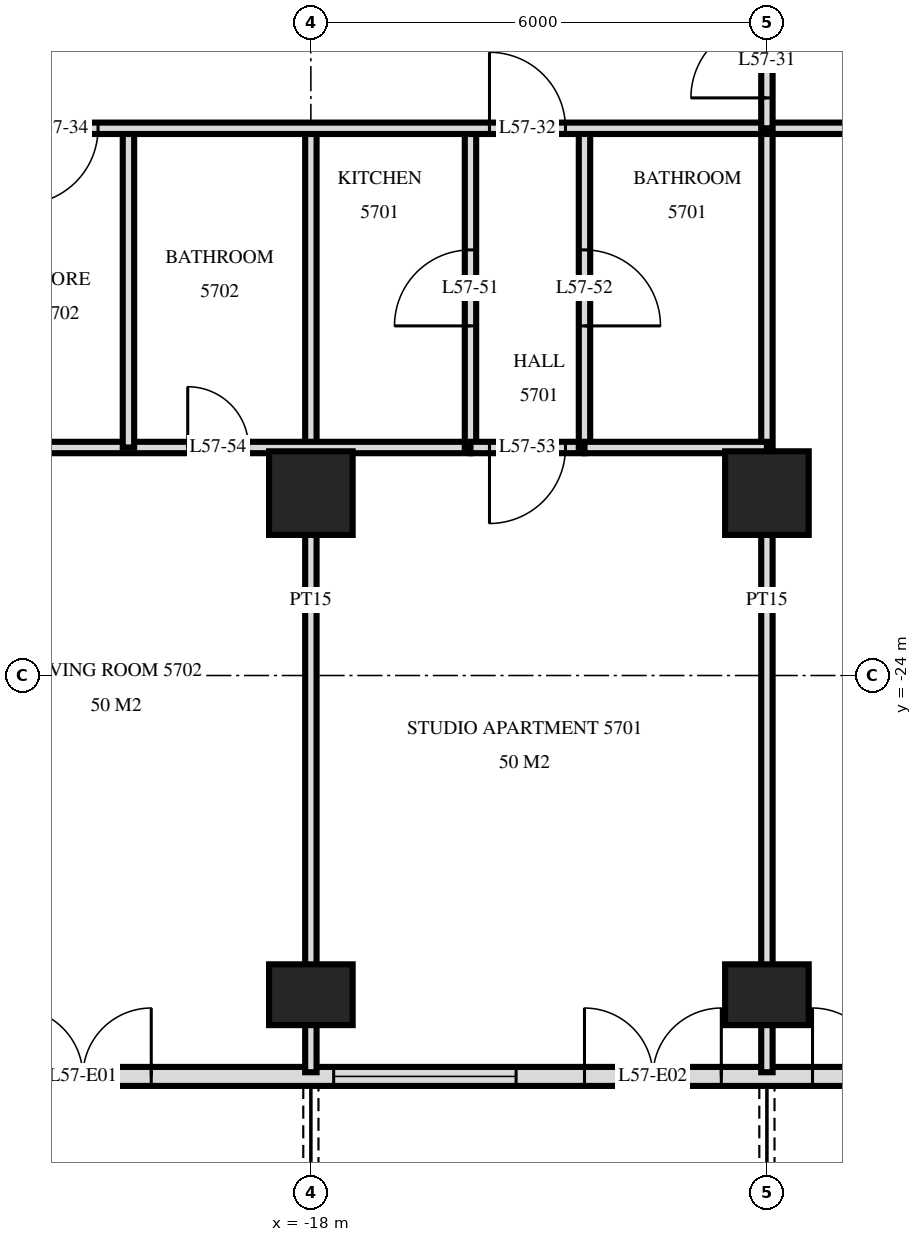
"""IFC4 building model, lengths in metres.
Left out: names, types, materials, properties, quantities, classifications, styles, units other than length and angle.
Written with IfcOpenShell. Run it as: python <this file> out.ifc"""

import sys

from ifc_helpers import new_model, si_unit, direction, frame, frame_2d, origin, origin_2d, place, context, subcontext, project, spatial, rectangle, extrude, element, fill, save


model = new_model("IFC4")
c1 = context("Model", 3, precision=1e-05, world=origin(), true_north=direction((0.0, 1.0)))
c2 = subcontext(c1, "Body", "Model", "MODEL_VIEW")
j1 = project(units=[si_unit("LENGTHUNIT", "METRE"), si_unit("PLANEANGLEUNIT", "RADIAN")], contexts=[c1])
p1 = place(None, origin())
s1 = spatial("IfcSite", under=j1, at=p1, CompositionType="ELEMENT")
p2 = place(p1, origin())
s2 = spatial("IfcBuilding", under=s1, at=p2, CompositionType="ELEMENT")
p3 = place(p2, frame((0.0, 0.0, 218.6)))
s3 = spatial("IfcBuildingStorey", under=s2, at=p3, CompositionType="ELEMENT", Elevation=218.6)
p4 = place(p3, frame((-18.0, -28.2, 0.0), z_axis=(0.0, 0.0, 1.0), x_axis=(1.0, 0.0, 0.0)))
e1 = element("IfcColumn", 1, at=p4, inside=s3, PredefinedType="COLUMN", context=c2, shape_type="SweptSolid", body=[
    extrude(rectangle(XDim=1.1, YDim=0.8, at=origin_2d()), origin(), (0.0, 0.0, 1.0), 3.5),
])
p5 = place(p3, frame((-18.0, -21.6, 0.0), z_axis=(0.0, 0.0, 1.0), x_axis=(1.0, 0.0, 0.0)))
e2 = element("IfcColumn", 2, at=p5, inside=s3, PredefinedType="COLUMN", context=c2, shape_type="SweptSolid", body=[
    extrude(rectangle(XDim=1.1, YDim=1.1, at=origin_2d()), origin(), (0.0, 0.0, 1.0), 3.5),
])
p6 = place(p3, frame((-12.0, -28.2, 0.0), z_axis=(0.0, 0.0, 1.0), x_axis=(1.0, 0.0, 0.0)))
e3 = element("IfcColumn", 3, at=p6, inside=s3, PredefinedType="COLUMN", context=c2, shape_type="SweptSolid", body=[
    extrude(rectangle(XDim=1.1, YDim=0.8, at=origin_2d()), origin(), (0.0, 0.0, 1.0), 3.5),
])
p7 = place(p3, frame((-12.0, -21.6, 0.0), z_axis=(0.0, 0.0, 1.0), x_axis=(1.0, 0.0, 0.0)))
e4 = element("IfcColumn", 4, at=p7, inside=s3, PredefinedType="COLUMN", context=c2, shape_type="SweptSolid", body=[
    extrude(rectangle(XDim=1.1, YDim=1.1, at=origin_2d()), origin(), (0.0, 0.0, 1.0), 3.5),
])
p8 = place(p3, frame((-22.475, -29.275, 0.0), z_axis=(0.0, 0.0, 1.0), x_axis=(1.0, 0.0, 0.0)))
e5 = element("IfcWall", 5, at=p8, inside=s3, PredefinedType="SOLIDWALL", context=c2, shape_type="SweptSolid", body=[
    extrude(rectangle(XDim=44.951, YDim=0.25, at=frame_2d((22.475, 0.0))), origin(), (0.0, 0.0, 1.0), 3.22),
])
p9 = place(p8, frame((0.575, 0.0, 0.0)))
e6 = element("IfcOpeningElement", 6, at=p9, cuts=e5, PredefinedType="OPENING", context=c2, shape_type="SweptSolid", body=[
    extrude(rectangle(XDim=1.8, YDim=2.4, at=frame_2d((0.9, 1.2))), frame((0.0, 0.135, 0.0), z_axis=(0.0, -1.0, 0.0), x_axis=(1.0, 0.0, 0.0)), (0.0, 0.0, 1.0), 0.27),
])
p10 = place(p8, frame((4.775, 0.0, 0.9)))
e7 = element("IfcOpeningElement", 7, at=p10, cuts=e5, PredefinedType="OPENING", context=c2, shape_type="SweptSolid", body=[
    extrude(rectangle(XDim=2.4, YDim=1.5, at=frame_2d((1.2, 0.75))), frame((0.0, 0.135, 0.0), z_axis=(0.0, -1.0, 0.0), x_axis=(1.0, 0.0, 0.0)), (0.0, 0.0, 1.0), 0.27),
])
p11 = place(p8, frame((8.075, 0.0, 0.0)))
e8 = element("IfcOpeningElement", 8, at=p11, cuts=e5, PredefinedType="OPENING", context=c2, shape_type="SweptSolid", body=[
    extrude(rectangle(XDim=1.8, YDim=2.4, at=frame_2d((0.9, 1.2))), frame((0.0, 0.135, 0.0), z_axis=(0.0, -1.0, 0.0), x_axis=(1.0, 0.0, 0.0)), (0.0, 0.0, 1.0), 0.27),
])
p12 = place(p8, frame((11.075, 0.0, 0.0)))
e9 = element("IfcOpeningElement", 9, at=p12, cuts=e5, PredefinedType="OPENING", context=c2, shape_type="SweptSolid", body=[
    extrude(rectangle(XDim=1.8, YDim=2.4, at=frame_2d((0.9, 1.2))), frame((0.0, 0.135, 0.0), z_axis=(0.0, -1.0, 0.0), x_axis=(1.0, 0.0, 0.0)), (0.0, 0.0, 1.0), 0.27),
])
p13 = place(p8, frame((13.775, 0.0, 0.9)))
e10 = element("IfcOpeningElement", 10, at=p13, cuts=e5, PredefinedType="OPENING", context=c2, shape_type="SweptSolid", body=[
    extrude(rectangle(XDim=2.4, YDim=1.5, at=frame_2d((1.2, 0.75))), frame((0.0, 0.135, 0.0), z_axis=(0.0, -1.0, 0.0), x_axis=(1.0, 0.0, 0.0)), (0.0, 0.0, 1.0), 0.27),
])
p14 = place(p8, frame((16.775, 0.0, 0.9)))
e11 = element("IfcOpeningElement", 11, at=p14, cuts=e5, PredefinedType="OPENING", context=c2, shape_type="SweptSolid", body=[
    extrude(rectangle(XDim=2.4, YDim=1.5, at=frame_2d((1.2, 0.75))), frame((0.0, 0.135, 0.0), z_axis=(0.0, -1.0, 0.0), x_axis=(1.0, 0.0, 0.0)), (0.0, 0.0, 1.0), 0.27),
])
p15 = place(p8, frame((20.075, 0.0, 0.0)))
e12 = element("IfcOpeningElement", 12, at=p15, cuts=e5, PredefinedType="OPENING", context=c2, shape_type="SweptSolid", body=[
    extrude(rectangle(XDim=1.8, YDim=2.4, at=frame_2d((0.9, 1.2))), frame((0.0, 0.135, 0.0), z_axis=(0.0, -1.0, 0.0), x_axis=(1.0, 0.0, 0.0)), (0.0, 0.0, 1.0), 0.27),
])
p16 = place(p8, frame((23.075, 0.0, 0.0)))
e13 = element("IfcOpeningElement", 13, at=p16, cuts=e5, PredefinedType="OPENING", context=c2, shape_type="SweptSolid", body=[
    extrude(rectangle(XDim=1.8, YDim=2.4, at=frame_2d((0.9, 1.2))), frame((0.0, 0.135, 0.0), z_axis=(0.0, -1.0, 0.0), x_axis=(1.0, 0.0, 0.0)), (0.0, 0.0, 1.0), 0.27),
])
p17 = place(p8, frame((25.775, 0.0, 0.9)))
e14 = element("IfcOpeningElement", 14, at=p17, cuts=e5, PredefinedType="OPENING", context=c2, shape_type="SweptSolid", body=[
    extrude(rectangle(XDim=2.4, YDim=1.5, at=frame_2d((1.2, 0.75))), frame((0.0, 0.135, 0.0), z_axis=(0.0, -1.0, 0.0), x_axis=(1.0, 0.0, 0.0)), (0.0, 0.0, 1.0), 0.27),
])
p18 = place(p8, frame((29.075, 0.0, 0.0)))
e15 = element("IfcOpeningElement", 15, at=p18, cuts=e5, PredefinedType="OPENING", context=c2, shape_type="SweptSolid", body=[
    extrude(rectangle(XDim=1.8, YDim=2.4, at=frame_2d((0.9, 1.2))), frame((0.0, 0.135, 0.0), z_axis=(0.0, -1.0, 0.0), x_axis=(1.0, 0.0, 0.0)), (0.0, 0.0, 1.0), 0.27),
])
p19 = place(p8, frame((31.775, 0.0, 0.9)))
e16 = element("IfcOpeningElement", 16, at=p19, cuts=e5, PredefinedType="OPENING", context=c2, shape_type="SweptSolid", body=[
    extrude(rectangle(XDim=2.4, YDim=1.5, at=frame_2d((1.2, 0.75))), frame((0.0, 0.135, 0.0), z_axis=(0.0, -1.0, 0.0), x_axis=(1.0, 0.0, 0.0)), (0.0, 0.0, 1.0), 0.27),
])
p20 = place(p8, frame((35.075, 0.0, 0.0)))
e17 = element("IfcOpeningElement", 17, at=p20, cuts=e5, PredefinedType="OPENING", context=c2, shape_type="SweptSolid", body=[
    extrude(rectangle(XDim=1.8, YDim=2.4, at=frame_2d((0.9, 1.2))), frame((0.0, 0.135, 0.0), z_axis=(0.0, -1.0, 0.0), x_axis=(1.0, 0.0, 0.0)), (0.0, 0.0, 1.0), 0.27),
])
p21 = place(p8, frame((41.075, 0.0, 0.0)))
e18 = element("IfcOpeningElement", 18, at=p21, cuts=e5, PredefinedType="OPENING", context=c2, shape_type="SweptSolid", body=[
    extrude(rectangle(XDim=1.8, YDim=2.4, at=frame_2d((0.9, 1.2))), frame((0.0, 0.135, 0.0), z_axis=(0.0, -1.0, 0.0), x_axis=(1.0, 0.0, 0.0)), (0.0, 0.0, 1.0), 0.27),
])
p22 = place(p3, frame((-12.0, -16.8, 0.0), z_axis=(0.0, 0.0, 1.0), x_axis=(0.0, 1.0, 0.0)))
e19 = element("IfcWall", 19, at=p22, inside=s3, PredefinedType="PARTITIONING", context=c2, shape_type="SweptSolid", body=[
    extrude(rectangle(XDim=1.75, YDim=0.15, at=frame_2d((0.875, 0.0))), origin(), (0.0, 0.0, 1.0), 3.22),
])
p23 = place(p22, frame((0.4, 0.0, 0.0)))
e20 = element("IfcOpeningElement", 20, at=p23, cuts=e19, PredefinedType="OPENING", context=c2, shape_type="SweptSolid", body=[
    extrude(rectangle(XDim=1.0, YDim=2.1, at=frame_2d((0.5, 1.05))), frame((0.0, 0.085, 0.0), z_axis=(0.0, -1.0, 0.0), x_axis=(1.0, 0.0, 0.0)), (0.0, 0.0, 1.0), 0.17),
])
p24 = place(p3, frame((-12.0, -29.22, 0.0), z_axis=(0.0, 0.0, 1.0), x_axis=(0.0, 1.0, 0.0)))
e21 = element("IfcWall", 21, at=p24, inside=s3, PredefinedType="PARTITIONING", context=c2, shape_type="SweptSolid", body=[
    extrude(rectangle(XDim=12.42, YDim=0.15, at=frame_2d((6.21, 0.0))), origin(), (0.0, 0.0, 1.0), 3.22),
])
p25 = place(p3, frame((-14.4, -21.0, 0.0), z_axis=(0.0, 0.0, 1.0), x_axis=(0.0, 1.0, 0.0)))
e22 = element("IfcWall", 22, at=p25, inside=s3, PredefinedType="PARTITIONING", context=c2, shape_type="SweptSolid", body=[
    extrude(rectangle(XDim=4.2, YDim=0.15, at=frame_2d((2.1, 0.0))), origin(), (0.0, 0.0, 1.0), 3.22),
])
p26 = place(p25, frame((1.6, 0.0, 0.0)))
e23 = element("IfcOpeningElement", 23, at=p26, cuts=e22, PredefinedType="OPENING", context=c2, shape_type="SweptSolid", body=[
    extrude(rectangle(XDim=1.0, YDim=2.1, at=frame_2d((0.5, 1.05))), frame((0.0, 0.085, 0.0), z_axis=(0.0, -1.0, 0.0), x_axis=(1.0, 0.0, 0.0)), (0.0, 0.0, 1.0), 0.17),
])
p27 = place(p3, frame((-15.9, -21.0, 0.0), z_axis=(0.0, 0.0, 1.0), x_axis=(0.0, 1.0, 0.0)))
e24 = element("IfcWall", 24, at=p27, inside=s3, PredefinedType="PARTITIONING", context=c2, shape_type="SweptSolid", body=[
    extrude(rectangle(XDim=4.2, YDim=0.15, at=frame_2d((2.1, 0.0))), origin(), (0.0, 0.0, 1.0), 3.22),
])
p28 = place(p27, frame((1.6, 0.0, 0.0)))
e25 = element("IfcOpeningElement", 25, at=p28, cuts=e24, PredefinedType="OPENING", context=c2, shape_type="SweptSolid", body=[
    extrude(rectangle(XDim=1.0, YDim=2.1, at=frame_2d((0.5, 1.05))), frame((0.0, 0.085, 0.0), z_axis=(0.0, -1.0, 0.0), x_axis=(1.0, 0.0, 0.0)), (0.0, 0.0, 1.0), 0.17),
])
p29 = place(p3, frame((-18.0, -29.22, 0.0), z_axis=(0.0, 0.0, 1.0), x_axis=(0.0, 1.0, 0.0)))
e26 = element("IfcWall", 26, at=p29, inside=s3, PredefinedType="PARTITIONING", context=c2, shape_type="SweptSolid", body=[
    extrude(rectangle(XDim=12.42, YDim=0.15, at=frame_2d((6.21, 0.0))), origin(), (0.0, 0.0, 1.0), 3.22),
])
p30 = place(p3, frame((-20.4, -21.0, 0.0), z_axis=(0.0, 0.0, 1.0), x_axis=(0.0, 1.0, 0.0)))
e27 = element("IfcWall", 27, at=p30, inside=s3, PredefinedType="PARTITIONING", context=c2, shape_type="SweptSolid", body=[
    extrude(rectangle(XDim=4.2, YDim=0.15, at=frame_2d((2.1, 0.0))), origin(), (0.0, 0.0, 1.0), 3.22),
])
p31 = place(p3, frame((-15.9, -21.0, 0.0), z_axis=(0.0, 0.0, 1.0), x_axis=(1.0, 0.0, 0.0)))
e28 = element("IfcWall", 28, at=p31, inside=s3, PredefinedType="PARTITIONING", context=c2, shape_type="SweptSolid", body=[
    extrude(rectangle(XDim=1.5, YDim=0.15, at=frame_2d((0.75, 0.0))), origin(), (0.0, 0.0, 1.0), 3.22),
])
p32 = place(p31, frame((0.25, 0.0, 0.0)))
e29 = element("IfcOpeningElement", 29, at=p32, cuts=e28, PredefinedType="OPENING", context=c2, shape_type="SweptSolid", body=[
    extrude(rectangle(XDim=1.0, YDim=2.1, at=frame_2d((0.5, 1.05))), frame((0.0, 0.085, 0.0), z_axis=(0.0, -1.0, 0.0), x_axis=(1.0, 0.0, 0.0)), (0.0, 0.0, 1.0), 0.17),
])
p33 = place(p3, frame((-22.2, -21.0, 0.0), z_axis=(0.0, 0.0, 1.0), x_axis=(1.0, 0.0, 0.0)))
e30 = element("IfcWall", 30, at=p33, inside=s3, PredefinedType="PARTITIONING", context=c2, shape_type="SweptSolid", body=[
    extrude(rectangle(XDim=6.3, YDim=0.15, at=frame_2d((3.15, 0.0))), origin(), (0.0, 0.0, 1.0), 3.22),
])
p34 = place(p33, frame((2.58, 0.0, 0.0)))
e31 = element("IfcOpeningElement", 31, at=p34, cuts=e30, PredefinedType="OPENING", context=c2, shape_type="SweptSolid", body=[
    extrude(rectangle(XDim=0.8, YDim=2.1, at=frame_2d((0.4, 1.05))), frame((0.0, 0.085, 0.0), z_axis=(0.0, -1.0, 0.0), x_axis=(1.0, 0.0, 0.0)), (0.0, 0.0, 1.0), 0.17),
])
p35 = place(p3, frame((-14.4, -21.0, 0.0), z_axis=(0.0, 0.0, 1.0), x_axis=(1.0, 0.0, 0.0)))
e32 = element("IfcWall", 32, at=p35, inside=s3, PredefinedType="PARTITIONING", context=c2, shape_type="SweptSolid", body=[
    extrude(rectangle(XDim=2.4, YDim=0.15, at=frame_2d((1.2, 0.0))), origin(), (0.0, 0.0, 1.0), 3.22),
])
p36 = place(p3, frame((-26.82, -16.8, 0.0), z_axis=(0.0, 0.0, 1.0), x_axis=(1.0, 0.0, 0.0)))
e33 = element("IfcWall", 33, at=p36, inside=s3, PredefinedType="PARTITIONING", context=c2, shape_type="SweptSolid", body=[
    extrude(rectangle(XDim=53.64, YDim=0.15, at=frame_2d((26.82, 0.0))), origin(), (0.0, 0.0, 1.0), 3.22),
])
p37 = place(p36, frame((11.17, 0.0, 0.0)))
e34 = element("IfcOpeningElement", 34, at=p37, cuts=e33, PredefinedType="OPENING", context=c2, shape_type="SweptSolid", body=[
    extrude(rectangle(XDim=1.0, YDim=2.1, at=frame_2d((0.5, 1.05))), frame((0.0, 0.085, 0.0), z_axis=(0.0, -1.0, 0.0), x_axis=(1.0, 0.0, 0.0)), (0.0, 0.0, 1.0), 0.17),
])
p38 = place(p36, frame((3.22, 0.0, 0.0)))
e35 = element("IfcOpeningElement", 35, at=p38, cuts=e33, PredefinedType="OPENING", context=c2, shape_type="SweptSolid", body=[
    extrude(rectangle(XDim=1.0, YDim=2.1, at=frame_2d((0.5, 1.05))), frame((0.0, 0.085, 0.0), z_axis=(0.0, -1.0, 0.0), x_axis=(1.0, 0.0, 0.0)), (0.0, 0.0, 1.0), 0.17),
])
p39 = place(p36, frame((5.02, 0.0, 0.0)))
e36 = element("IfcOpeningElement", 36, at=p39, cuts=e33, PredefinedType="OPENING", context=c2, shape_type="SweptSolid", body=[
    extrude(rectangle(XDim=1.0, YDim=2.1, at=frame_2d((0.5, 1.05))), frame((0.0, 0.085, 0.0), z_axis=(0.0, -1.0, 0.0), x_axis=(1.0, 0.0, 0.0)), (0.0, 0.0, 1.0), 0.17),
])
p40 = place(p36, frame((47.72, 0.0, 0.0)))
e37 = element("IfcOpeningElement", 37, at=p40, cuts=e33, PredefinedType="OPENING", context=c2, shape_type="SweptSolid", body=[
    extrude(rectangle(XDim=1.0, YDim=2.1, at=frame_2d((0.5, 1.05))), frame((0.0, 0.085, 0.0), z_axis=(0.0, -1.0, 0.0), x_axis=(1.0, 0.0, 0.0)), (0.0, 0.0, 1.0), 0.17),
])
p41 = place(p36, frame((51.04, 0.0, 0.0)))
e38 = element("IfcOpeningElement", 38, at=p41, cuts=e33, PredefinedType="OPENING", context=c2, shape_type="SweptSolid", body=[
    extrude(rectangle(XDim=1.0, YDim=2.1, at=frame_2d((0.5, 1.05))), frame((0.0, 0.085, 0.0), z_axis=(0.0, -1.0, 0.0), x_axis=(1.0, 0.0, 0.0)), (0.0, 0.0, 1.0), 0.17),
])
p42 = place(p36, frame((17.32, 0.0, 0.0)))
e39 = element("IfcOpeningElement", 39, at=p42, cuts=e33, PredefinedType="OPENING", context=c2, shape_type="SweptSolid", body=[
    extrude(rectangle(XDim=1.0, YDim=2.1, at=frame_2d((0.5, 1.05))), frame((0.0, 0.085, 0.0), z_axis=(0.0, -1.0, 0.0), x_axis=(1.0, 0.0, 0.0)), (0.0, 0.0, 1.0), 0.17),
])
p43 = place(p36, frame((26.32, 0.0, 0.0)))
e40 = element("IfcOpeningElement", 40, at=p43, cuts=e33, PredefinedType="OPENING", context=c2, shape_type="SweptSolid", body=[
    extrude(rectangle(XDim=1.0, YDim=2.1, at=frame_2d((0.5, 1.05))), frame((0.0, 0.085, 0.0), z_axis=(0.0, -1.0, 0.0), x_axis=(1.0, 0.0, 0.0)), (0.0, 0.0, 1.0), 0.17),
])
p44 = place(p36, frame((35.32, 0.0, 0.0)))
e41 = element("IfcOpeningElement", 41, at=p44, cuts=e33, PredefinedType="OPENING", context=c2, shape_type="SweptSolid", body=[
    extrude(rectangle(XDim=1.0, YDim=2.1, at=frame_2d((0.5, 1.05))), frame((0.0, 0.085, 0.0), z_axis=(0.0, -1.0, 0.0), x_axis=(1.0, 0.0, 0.0)), (0.0, 0.0, 1.0), 0.17),
])
p45 = place(p9, origin())
e42 = element("IfcDoor", 42, at=p45, inside=s3, OperationType="DOUBLE_DOOR_SINGLE_SWING", PredefinedType="DOOR", context=c2, shape_type="SweptSolid", body=[
    extrude(rectangle(XDim=1.8, YDim=2.4, at=frame_2d((0.9, 1.2))), frame((0.0, 0.025, 0.0), z_axis=(0.0, -1.0, 0.0), x_axis=(1.0, 0.0, 0.0)), (0.0, 0.0, 1.0), 0.05),
])
fill(e6, e42)
p46 = place(p10, origin())
e43 = element("IfcWindow", 43, at=p46, inside=s3, PartitioningType="SINGLE_PANEL", PredefinedType="WINDOW", context=c2, shape_type="SweptSolid", body=[
    extrude(rectangle(XDim=2.4, YDim=1.5, at=frame_2d((1.2, 0.75))), frame((0.0, 0.03, 0.0), z_axis=(0.0, -1.0, 0.0), x_axis=(1.0, 0.0, 0.0)), (0.0, 0.0, 1.0), 0.06),
])
fill(e7, e43)
p47 = place(p11, origin())
e44 = element("IfcDoor", 44, at=p47, inside=s3, OperationType="DOUBLE_DOOR_SINGLE_SWING", PredefinedType="DOOR", context=c2, shape_type="SweptSolid", body=[
    extrude(rectangle(XDim=1.8, YDim=2.4, at=frame_2d((0.9, 1.2))), frame((0.0, 0.025, 0.0), z_axis=(0.0, -1.0, 0.0), x_axis=(1.0, 0.0, 0.0)), (0.0, 0.0, 1.0), 0.05),
])
fill(e8, e44)
p48 = place(p12, origin())
e45 = element("IfcDoor", 45, at=p48, inside=s3, OperationType="DOUBLE_DOOR_SINGLE_SWING", PredefinedType="DOOR", context=c2, shape_type="SweptSolid", body=[
    extrude(rectangle(XDim=1.8, YDim=2.4, at=frame_2d((0.9, 1.2))), frame((0.0, 0.025, 0.0), z_axis=(0.0, -1.0, 0.0), x_axis=(1.0, 0.0, 0.0)), (0.0, 0.0, 1.0), 0.05),
])
fill(e9, e45)
p49 = place(p23, origin())
e46 = element("IfcDoor", 46, at=p49, inside=s3, OperationType="SINGLE_SWING_RIGHT", PredefinedType="DOOR", context=c2, shape_type="SweptSolid", body=[
    extrude(rectangle(XDim=1.0, YDim=2.1, at=frame_2d((0.5, 1.05))), frame((0.0, 0.025, 0.0), z_axis=(0.0, -1.0, 0.0), x_axis=(1.0, 0.0, 0.0)), (0.0, 0.0, 1.0), 0.05),
])
fill(e20, e46)
p50 = place(p37, origin())
e47 = element("IfcDoor", 47, at=p50, inside=s3, OperationType="SINGLE_SWING_RIGHT", PredefinedType="DOOR", context=c2, shape_type="SweptSolid", body=[
    extrude(rectangle(XDim=1.0, YDim=2.1, at=frame_2d((0.5, 1.05))), frame((0.0, 0.025, 0.0), z_axis=(0.0, -1.0, 0.0), x_axis=(1.0, 0.0, 0.0)), (0.0, 0.0, 1.0), 0.05),
])
fill(e34, e47)
p51 = place(p39, frame((0.5, 0.0, 0.0), z_axis=(0.0, 0.0, 1.0), x_axis=(-1.0, 0.0, 0.0)))
e48 = element("IfcDoor", 48, at=p51, inside=s3, OperationType="SINGLE_SWING_LEFT", PredefinedType="DOOR", context=c2, shape_type="SweptSolid", body=[
    extrude(rectangle(XDim=1.0, YDim=2.1, at=frame_2d((0.0, 1.05))), frame((0.0, -0.025, 0.0), z_axis=(0.0, 1.0, 0.0), x_axis=(-1.0, 0.0, 0.0)), (0.0, 0.0, 1.0), 0.05),
])
fill(e36, e48)
p52 = place(p28, origin())
e49 = element("IfcDoor", 49, at=p52, inside=s3, OperationType="SINGLE_SWING_RIGHT", PredefinedType="DOOR", context=c2, shape_type="SweptSolid", body=[
    extrude(rectangle(XDim=1.0, YDim=2.1, at=frame_2d((0.5, 1.05))), frame((0.0, 0.025, 0.0), z_axis=(0.0, -1.0, 0.0), x_axis=(1.0, 0.0, 0.0)), (0.0, 0.0, 1.0), 0.05),
])
fill(e25, e49)
p53 = place(p26, frame((0.5, 0.0, 0.0), z_axis=(0.0, 0.0, 1.0), x_axis=(-1.0, 0.0, 0.0)))
e50 = element("IfcDoor", 50, at=p53, inside=s3, OperationType="SINGLE_SWING_LEFT", PredefinedType="DOOR", context=c2, shape_type="SweptSolid", body=[
    extrude(rectangle(XDim=1.0, YDim=2.1, at=frame_2d((0.0, 1.05))), frame((0.0, -0.025, 0.0), z_axis=(0.0, 1.0, 0.0), x_axis=(-1.0, 0.0, 0.0)), (0.0, 0.0, 1.0), 0.05),
])
fill(e23, e50)
p54 = place(p32, frame((0.5, 0.0, 0.0), z_axis=(0.0, 0.0, 1.0), x_axis=(-1.0, 0.0, 0.0)))
e51 = element("IfcDoor", 51, at=p54, inside=s3, OperationType="SINGLE_SWING_LEFT", PredefinedType="DOOR", context=c2, shape_type="SweptSolid", body=[
    extrude(rectangle(XDim=1.0, YDim=2.1, at=frame_2d((0.0, 1.05))), frame((0.0, -0.025, 0.0), z_axis=(0.0, 1.0, 0.0), x_axis=(-1.0, 0.0, 0.0)), (0.0, 0.0, 1.0), 0.05),
])
fill(e29, e51)
p55 = place(p34, origin())
e52 = element("IfcDoor", 52, at=p55, inside=s3, OperationType="SINGLE_SWING_RIGHT", PredefinedType="DOOR", context=c2, shape_type="SweptSolid", body=[
    extrude(rectangle(XDim=0.8, YDim=2.1, at=frame_2d((0.4, 1.05))), frame((0.0, 0.025, 0.0), z_axis=(0.0, -1.0, 0.0), x_axis=(1.0, 0.0, 0.0)), (0.0, 0.0, 1.0), 0.05),
])
fill(e31, e52)
save(model, sys.argv[1])
